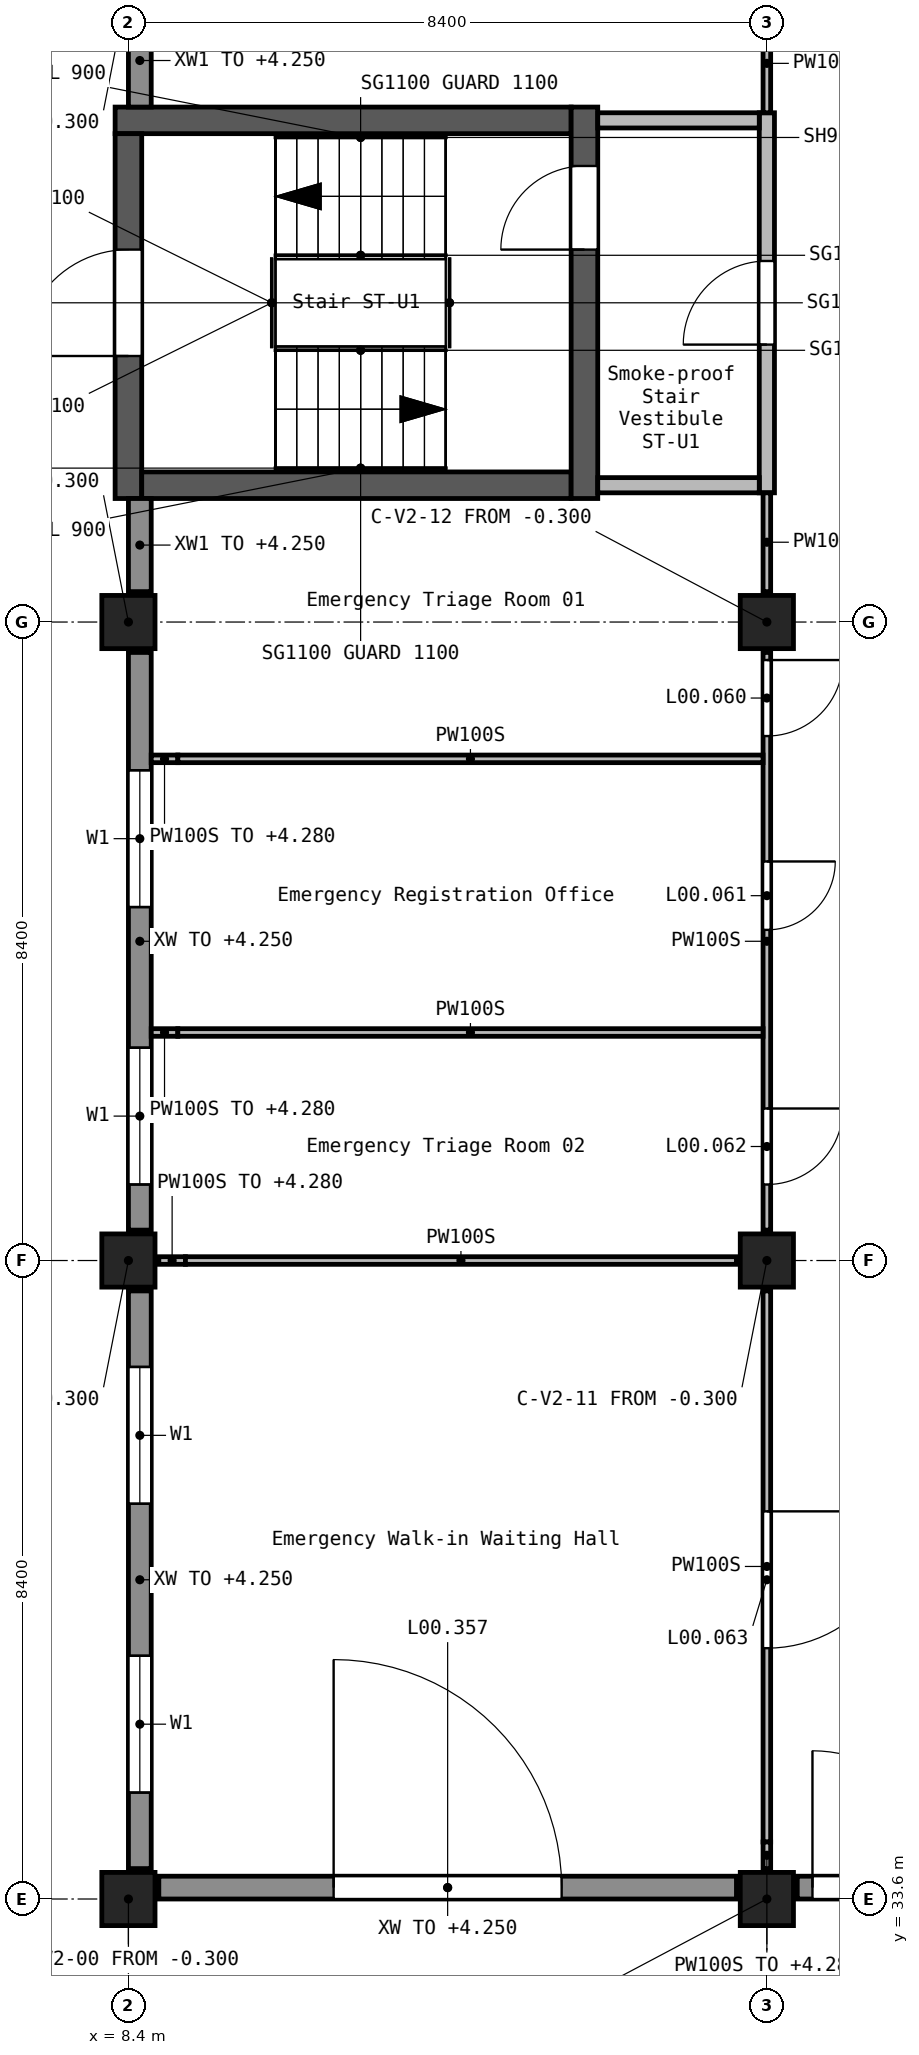
"""IFC4 building model, lengths in metres.
Left out: names, types, materials, properties, quantities, classifications, styles, units other than length and angle.
Written with IfcOpenShell. Run it as: python <this file> out.ifc"""

import sys

from ifc_helpers import new_model, si_unit, direction, frame, frame_2d, origin, origin_2d, place, context, subcontext, project, spatial, rectangle, extrude, element, fill, save


model = new_model("IFC4")
c1 = context("Model", 3, precision=1e-05, world=origin(), true_north=direction((0.0, 1.0)))
c2 = subcontext(c1, "Body", "Model", "MODEL_VIEW")
j1 = project(units=[si_unit("LENGTHUNIT", "METRE"), si_unit("PLANEANGLEUNIT", "RADIAN")], contexts=[c1])
p1 = place(None, origin())
s1 = spatial("IfcSite", under=j1, at=p1, CompositionType="ELEMENT")
p2 = place(p1, origin())
s2 = spatial("IfcBuilding", under=s1, at=p2, CompositionType="ELEMENT")
p3 = place(p2, origin())
s3 = spatial("IfcBuildingStorey", under=s2, at=p3, CompositionType="ELEMENT", Elevation=0.0)
for number, where, z_axis, x_axis in (
    (1, (8.4, 33.6, -0.3), (0.0, 0.0, 1.0), (1.0, 0.0, 0.0)),
    (2, (8.4, 42.0, -0.3), (0.0, 0.0, 1.0), (1.0, 0.0, 0.0)),
    (3, (8.4, 50.4, -0.3), (0.0, 0.0, 1.0), (1.0, 0.0, 0.0)),
    (4, (16.8, 33.6, -0.3), (0.0, 0.0, 1.0), (1.0, 0.0, 0.0)),
    (5, (16.8, 42.0, -0.3), (0.0, 0.0, 1.0), (1.0, 0.0, 0.0)),
    (6, (16.8, 50.4, -0.3), (0.0, 0.0, 1.0), (1.0, 0.0, 0.0)),
):
    element("IfcColumn", number, at=place(p3, frame(where, z_axis=z_axis, x_axis=x_axis)), inside=s3, PredefinedType="COLUMN", context=c2, shape_type="SweptSolid", body=[
        extrude(rectangle(XDim=0.7, YDim=0.7, at=origin_2d()), origin(), (0.0, 0.0, 1.0), 5.7),
    ])
p4 = place(p3, frame((8.225, 57.0, -0.3), z_axis=(0.0, 0.0, 1.0), x_axis=(1.0, 0.0, 0.0)))
e7 = element("IfcWall", 7, at=p4, inside=s3, PredefinedType="SHEAR", context=c2, shape_type="SweptSolid", body=[
    extrude(rectangle(XDim=6.0, YDim=0.35, at=frame_2d((3.0, 0.0))), origin(), (0.0, 0.0, 1.0), 5.7),
])
p5 = place(p3, frame((8.4, 52.025, -0.3), z_axis=(0.0, 0.0, 1.0), x_axis=(0.0, 1.0, 0.0)))
e8 = element("IfcWall", 8, at=p5, inside=s3, PredefinedType="SHEAR", context=c2, shape_type="SweptSolid", body=[
    extrude(rectangle(XDim=4.8, YDim=0.35, at=frame_2d((2.4, 0.0))), origin(), (0.0, 0.0, 1.0), 5.7),
])
p6 = place(p5, frame((1.875, 0.0, 0.3)))
e9 = element("IfcOpeningElement", 9, at=p6, cuts=e8, PredefinedType="OPENING", context=c2, shape_type="SweptSolid", body=[
    extrude(rectangle(XDim=1.4, YDim=2.1, at=frame_2d((0.7, 1.05))), frame((0.0, 0.185, 0.0), z_axis=(0.0, -1.0, 0.0), x_axis=(1.0, 0.0, 0.0)), (0.0, 0.0, 1.0), 0.37),
])
p7 = place(p3, frame((8.575, 52.2, -0.3), z_axis=(0.0, 0.0, 1.0), x_axis=(1.0, 0.0, 0.0)))
e10 = element("IfcWall", 10, at=p7, inside=s3, PredefinedType="SHEAR", context=c2, shape_type="SweptSolid", body=[
    extrude(rectangle(XDim=5.65, YDim=0.35, at=frame_2d((2.825, 0.0))), origin(), (0.0, 0.0, 1.0), 5.7),
])
p8 = place(p3, frame((14.4, 52.025, -0.3), z_axis=(0.0, 0.0, 1.0), x_axis=(0.0, 1.0, 0.0)))
e11 = element("IfcWall", 11, at=p8, inside=s3, PredefinedType="SHEAR", context=c2, shape_type="SweptSolid", body=[
    extrude(rectangle(XDim=5.15, YDim=0.35, at=frame_2d((2.575, 0.0))), origin(), (0.0, 0.0, 1.0), 5.7),
])
p9 = place(p8, frame((3.275, 0.0, 0.3)))
e12 = element("IfcOpeningElement", 12, at=p9, cuts=e11, PredefinedType="OPENING", context=c2, shape_type="SweptSolid", body=[
    extrude(rectangle(XDim=1.1, YDim=2.1, at=frame_2d((0.55, 1.05))), frame((0.0, 0.185, 0.0), z_axis=(0.0, -1.0, 0.0), x_axis=(1.0, 0.0, 0.0)), (0.0, 0.0, 1.0), 0.37),
])
for number, where, z_axis, x_axis in (
    (13, (8.55, 58.4, 0.0), (0.0, 0.0, 1.0), (0.0, -1.0, 0.0)),
    (14, (8.55, 52.025, 0.0), (0.0, 0.0, 1.0), (0.0, -1.0, 0.0)),
):
    element("IfcWall", number, at=place(p3, frame(where, z_axis=z_axis, x_axis=x_axis)), inside=s3, PredefinedType="STANDARD", context=c2, shape_type="SweptSolid", body=[
        extrude(rectangle(XDim=1.225, YDim=0.3, at=frame_2d((0.612, 0.0))), origin(), (0.0, 0.0, 1.0), 4.25),
    ])
p10 = place(p3, frame((8.55, 50.0, 0.0), z_axis=(0.0, 0.0, 1.0), x_axis=(0.0, -1.0, 0.0)))
e15 = element("IfcWall", 15, at=p10, inside=s3, PredefinedType="STANDARD", context=c2, shape_type="SweptSolid", body=[
    extrude(rectangle(XDim=7.6, YDim=0.3, at=frame_2d((3.8, 0.0))), origin(), (0.0, 0.0, 1.0), 4.25),
])
p11 = place(p10, frame((1.55, 0.0, 0.9)))
e16 = element("IfcOpeningElement", 16, at=p11, cuts=e15, PredefinedType="OPENING", context=c2, shape_type="SweptSolid", body=[
    extrude(rectangle(XDim=1.8, YDim=1.5, at=frame_2d((0.9, 0.75))), frame((0.0, 0.16, 0.0), z_axis=(0.0, -1.0, 0.0), x_axis=(1.0, 0.0, 0.0)), (0.0, 0.0, 1.0), 0.32),
])
p12 = place(p10, frame((5.2, 0.0, 0.9)))
e17 = element("IfcOpeningElement", 17, at=p12, cuts=e15, PredefinedType="OPENING", context=c2, shape_type="SweptSolid", body=[
    extrude(rectangle(XDim=1.8, YDim=1.5, at=frame_2d((0.9, 0.75))), frame((0.0, 0.16, 0.0), z_axis=(0.0, -1.0, 0.0), x_axis=(1.0, 0.0, 0.0)), (0.0, 0.0, 1.0), 0.32),
])
p13 = place(p3, frame((8.55, 41.6, 0.0), z_axis=(0.0, 0.0, 1.0), x_axis=(0.0, -1.0, 0.0)))
e18 = element("IfcWall", 18, at=p13, inside=s3, PredefinedType="STANDARD", context=c2, shape_type="SweptSolid", body=[
    extrude(rectangle(XDim=7.6, YDim=0.3, at=frame_2d((3.8, 0.0))), origin(), (0.0, 0.0, 1.0), 4.25),
])
p14 = place(p13, frame((1.0, 0.0, 0.9)))
e19 = element("IfcOpeningElement", 19, at=p14, cuts=e18, PredefinedType="OPENING", context=c2, shape_type="SweptSolid", body=[
    extrude(rectangle(XDim=1.8, YDim=1.5, at=frame_2d((0.9, 0.75))), frame((0.0, 0.16, 0.0), z_axis=(0.0, -1.0, 0.0), x_axis=(1.0, 0.0, 0.0)), (0.0, 0.0, 1.0), 0.32),
])
p15 = place(p13, frame((4.8, 0.0, 0.9)))
e20 = element("IfcOpeningElement", 20, at=p15, cuts=e18, PredefinedType="OPENING", context=c2, shape_type="SweptSolid", body=[
    extrude(rectangle(XDim=1.8, YDim=1.5, at=frame_2d((0.9, 0.75))), frame((0.0, 0.16, 0.0), z_axis=(0.0, -1.0, 0.0), x_axis=(1.0, 0.0, 0.0)), (0.0, 0.0, 1.0), 0.32),
])
p16 = place(p3, frame((8.8, 33.75, 0.0), z_axis=(0.0, 0.0, 1.0), x_axis=(1.0, 0.0, 0.0)))
e21 = element("IfcWall", 21, at=p16, inside=s3, PredefinedType="STANDARD", context=c2, shape_type="SweptSolid", body=[
    extrude(rectangle(XDim=7.6, YDim=0.3, at=frame_2d((3.8, 0.0))), origin(), (0.0, 0.0, 1.0), 4.25),
])
p17 = place(p16, frame((2.3, 0.0, 0.0)))
e22 = element("IfcOpeningElement", 22, at=p17, cuts=e21, PredefinedType="OPENING", context=c2, shape_type="SweptSolid", body=[
    extrude(rectangle(XDim=3.0, YDim=2.4, at=frame_2d((1.5, 1.2))), frame((0.0, 0.16, 0.0), z_axis=(0.0, -1.0, 0.0), x_axis=(1.0, 0.0, 0.0)), (0.0, 0.0, 1.0), 0.32),
])
p18 = place(p3, frame((17.2, 33.75, 0.0), z_axis=(0.0, 0.0, 1.0), x_axis=(1.0, 0.0, 0.0)))
e23 = element("IfcWall", 23, at=p18, inside=s3, PredefinedType="STANDARD", context=c2, shape_type="SweptSolid", body=[
    extrude(rectangle(XDim=7.6, YDim=0.3, at=frame_2d((3.8, 0.0))), origin(), (0.0, 0.0, 1.0), 4.25),
])
p19 = place(p18, frame((0.2, 0.0, 0.0)))
e24 = element("IfcOpeningElement", 24, at=p19, cuts=e23, PredefinedType="OPENING", context=c2, shape_type="SweptSolid", body=[
    extrude(rectangle(XDim=1.8, YDim=2.1, at=frame_2d((0.9, 1.05))), frame((0.0, 0.16, 0.0), z_axis=(0.0, -1.0, 0.0), x_axis=(1.0, 0.0, 0.0)), (0.0, 0.0, 1.0), 0.32),
])
p20 = place(p18, frame((4.8, 0.0, 0.9)))
e25 = element("IfcOpeningElement", 25, at=p20, cuts=e23, PredefinedType="OPENING", context=c2, shape_type="SweptSolid", body=[
    extrude(rectangle(XDim=1.8, YDim=1.5, at=frame_2d((0.9, 0.75))), frame((0.0, 0.16, 0.0), z_axis=(0.0, -1.0, 0.0), x_axis=(1.0, 0.0, 0.0)), (0.0, 0.0, 1.0), 0.32),
])
p21 = place(p3, frame((16.8, 52.1, 0.0), z_axis=(0.0, 0.0, 1.0), x_axis=(0.0, 1.0, 0.0)))
e26 = element("IfcWall", 26, at=p21, inside=s3, PredefinedType="SOLIDWALL", context=c2, shape_type="SweptSolid", body=[
    extrude(rectangle(XDim=5.0, YDim=0.2, at=frame_2d((2.5, 0.0))), origin(), (0.0, 0.0, 1.0), 5.05),
])
p22 = place(p21, frame((1.95, 0.0, 0.0)))
e27 = element("IfcOpeningElement", 27, at=p22, cuts=e26, PredefinedType="OPENING", context=c2, shape_type="SweptSolid", body=[
    extrude(rectangle(XDim=1.1, YDim=2.1, at=frame_2d((0.55, 1.05))), frame((0.0, 0.11, 0.0), z_axis=(0.0, -1.0, 0.0), x_axis=(1.0, 0.0, 0.0)), (0.0, 0.0, 1.0), 0.22),
])
for number, where, z_axis, x_axis in (
    (28, (14.575, 52.2, 0.0), (0.0, 0.0, 1.0), (1.0, 0.0, 0.0)),
    (29, (14.575, 57.0, 0.0), (0.0, 0.0, 1.0), (1.0, 0.0, 0.0)),
):
    element("IfcWall", number, at=place(p3, frame(where, z_axis=z_axis, x_axis=x_axis)), inside=s3, PredefinedType="SOLIDWALL", context=c2, shape_type="SweptSolid", body=[
        extrude(rectangle(XDim=2.125, YDim=0.2, at=frame_2d((1.062, 0.0))), origin(), (0.0, 0.0, 1.0), 5.05),
    ])
p23 = place(p3, frame((16.8, 52.1, 0.0), z_axis=(0.0, 0.0, 1.0), x_axis=(0.0, -1.0, 0.0)))
e30 = element("IfcWall", 30, at=p23, inside=s3, PredefinedType="PARTITIONING", context=c2, shape_type="SweptSolid", body=[
    extrude(rectangle(XDim=1.3, YDim=0.1, at=frame_2d((0.65, 0.0))), origin(), (0.0, 0.0, 1.0), 5.05),
])
p24 = place(p3, frame((16.8, 50.0, 0.0), z_axis=(0.0, 0.0, 1.0), x_axis=(0.0, -1.0, 0.0)))
e31 = element("IfcWall", 31, at=p24, inside=s3, PredefinedType="PARTITIONING", context=c2, shape_type="SweptSolid", body=[
    extrude(rectangle(XDim=7.6, YDim=0.1, at=frame_2d((3.8, 0.0))), origin(), (0.0, 0.0, 1.0), 5.05),
])
p25 = place(p24, frame((0.1, 0.0, 0.0)))
e32 = element("IfcOpeningElement", 32, at=p25, cuts=e31, PredefinedType="OPENING", context=c2, shape_type="SweptSolid", body=[
    extrude(rectangle(XDim=1.0, YDim=2.1, at=frame_2d((0.5, 1.05))), frame((0.0, 0.06, 0.0), z_axis=(0.0, -1.0, 0.0), x_axis=(1.0, 0.0, 0.0)), (0.0, 0.0, 1.0), 0.12),
])
p26 = place(p24, frame((2.75, 0.0, 0.0)))
e33 = element("IfcOpeningElement", 33, at=p26, cuts=e31, PredefinedType="OPENING", context=c2, shape_type="SweptSolid", body=[
    extrude(rectangle(XDim=0.9, YDim=2.1, at=frame_2d((0.45, 1.05))), frame((0.0, 0.06, 0.0), z_axis=(0.0, -1.0, 0.0), x_axis=(1.0, 0.0, 0.0)), (0.0, 0.0, 1.0), 0.12),
])
p27 = place(p24, frame((6.0, 0.0, 0.0)))
e34 = element("IfcOpeningElement", 34, at=p27, cuts=e31, PredefinedType="OPENING", context=c2, shape_type="SweptSolid", body=[
    extrude(rectangle(XDim=1.0, YDim=2.1, at=frame_2d((0.5, 1.05))), frame((0.0, 0.06, 0.0), z_axis=(0.0, -1.0, 0.0), x_axis=(1.0, 0.0, 0.0)), (0.0, 0.0, 1.0), 0.12),
])
p28 = place(p3, frame((16.8, 41.6, 0.0), z_axis=(0.0, 0.0, 1.0), x_axis=(0.0, -1.0, 0.0)))
e35 = element("IfcWall", 35, at=p28, inside=s3, PredefinedType="PARTITIONING", context=c2, shape_type="SweptSolid", body=[
    extrude(rectangle(XDim=7.25, YDim=0.1, at=frame_2d((3.625, 0.0))), origin(), (0.0, 0.0, 1.0), 5.05),
])
p29 = place(p28, frame((2.9, 0.0, 0.0)))
e36 = element("IfcOpeningElement", 36, at=p29, cuts=e35, PredefinedType="OPENING", context=c2, shape_type="SweptSolid", body=[
    extrude(rectangle(XDim=1.8, YDim=2.1, at=frame_2d((0.9, 1.05))), frame((0.0, 0.06, 0.0), z_axis=(0.0, -1.0, 0.0), x_axis=(1.0, 0.0, 0.0)), (0.0, 0.0, 1.0), 0.12),
])
p30 = place(p3, frame((16.8, 34.35, 0.0), z_axis=(0.0, 0.0, 1.0), x_axis=(0.0, -1.0, 0.0)))
e37 = element("IfcWall", 37, at=p30, inside=s3, PredefinedType="PARTITIONING", context=c2, shape_type="SweptSolid", body=[
    extrude(rectangle(XDim=0.35, YDim=0.1, at=frame_2d((0.175, 0.0))), origin(), (0.0, 0.0, 1.0), 4.28),
])
p31 = place(p3, frame((16.8, 58.4, 0.0), z_axis=(0.0, 0.0, 1.0), x_axis=(0.0, -1.0, 0.0)))
e38 = element("IfcWall", 38, at=p31, inside=s3, PredefinedType="PARTITIONING", context=c2, shape_type="SweptSolid", body=[
    extrude(rectangle(XDim=1.3, YDim=0.1, at=frame_2d((0.65, 0.0))), origin(), (0.0, 0.0, 1.0), 5.05),
])
p32 = place(p3, frame((8.8, 42.0, 0.0), z_axis=(0.0, 0.0, 1.0), x_axis=(1.0, 0.0, 0.0)))
e39 = element("IfcWall", 39, at=p32, inside=s3, PredefinedType="PARTITIONING", context=c2, shape_type="SweptSolid", body=[
    extrude(rectangle(XDim=0.35, YDim=0.1, at=frame_2d((0.175, 0.0))), origin(), (0.0, 0.0, 1.0), 4.28),
])
p33 = place(p3, frame((9.15, 42.0, 0.0), z_axis=(0.0, 0.0, 1.0), x_axis=(1.0, 0.0, 0.0)))
e40 = element("IfcWall", 40, at=p33, inside=s3, PredefinedType="PARTITIONING", context=c2, shape_type="SweptSolid", body=[
    extrude(rectangle(XDim=7.25, YDim=0.1, at=frame_2d((3.625, 0.0))), origin(), (0.0, 0.0, 1.0), 5.05),
])
p34 = place(p3, frame((8.7, 45.0, 0.0), z_axis=(0.0, 0.0, 1.0), x_axis=(1.0, 0.0, 0.0)))
e41 = element("IfcWall", 41, at=p34, inside=s3, PredefinedType="PARTITIONING", context=c2, shape_type="SweptSolid", body=[
    extrude(rectangle(XDim=0.35, YDim=0.1, at=frame_2d((0.175, 0.0))), origin(), (0.0, 0.0, 1.0), 4.28),
])
p35 = place(p3, frame((9.05, 45.0, 0.0), z_axis=(0.0, 0.0, 1.0), x_axis=(1.0, 0.0, 0.0)))
e42 = element("IfcWall", 42, at=p35, inside=s3, PredefinedType="PARTITIONING", context=c2, shape_type="SweptSolid", body=[
    extrude(rectangle(XDim=7.7, YDim=0.1, at=frame_2d((3.85, 0.0))), origin(), (0.0, 0.0, 1.0), 5.05),
])
p36 = place(p3, frame((8.7, 48.6, 0.0), z_axis=(0.0, 0.0, 1.0), x_axis=(1.0, 0.0, 0.0)))
e43 = element("IfcWall", 43, at=p36, inside=s3, PredefinedType="PARTITIONING", context=c2, shape_type="SweptSolid", body=[
    extrude(rectangle(XDim=0.35, YDim=0.1, at=frame_2d((0.175, 0.0))), origin(), (0.0, 0.0, 1.0), 4.28),
])
p37 = place(p3, frame((9.05, 48.6, 0.0), z_axis=(0.0, 0.0, 1.0), x_axis=(1.0, 0.0, 0.0)))
e44 = element("IfcWall", 44, at=p37, inside=s3, PredefinedType="PARTITIONING", context=c2, shape_type="SweptSolid", body=[
    extrude(rectangle(XDim=7.7, YDim=0.1, at=frame_2d((3.85, 0.0))), origin(), (0.0, 0.0, 1.0), 5.05),
])
p38 = place(p6, origin())
e45 = element("IfcDoor", 45, at=p38, inside=s3, OperationType="SINGLE_SWING_LEFT", PredefinedType="DOOR", context=c2, shape_type="SweptSolid", body=[
    extrude(rectangle(XDim=1.4, YDim=2.1, at=frame_2d((0.7, 1.05))), frame((0.0, 0.025, 0.0), z_axis=(0.0, -1.0, 0.0), x_axis=(1.0, 0.0, 0.0)), (0.0, 0.0, 1.0), 0.05),
])
fill(e9, e45)
p39 = place(p17, frame((3.0, 0.0, 0.0), z_axis=(0.0, 0.0, 1.0), x_axis=(-1.0, 0.0, 0.0)))
e46 = element("IfcDoor", 46, at=p39, inside=s3, OperationType="SINGLE_SWING_LEFT", PredefinedType="DOOR", context=c2, shape_type="SweptSolid", body=[
    extrude(rectangle(XDim=3.0, YDim=2.4, at=frame_2d((1.5, 1.2))), frame((0.0, 0.025, 0.0), z_axis=(0.0, -1.0, 0.0), x_axis=(1.0, 0.0, 0.0)), (0.0, 0.0, 1.0), 0.05),
])
fill(e22, e46)
p40 = place(p19, frame((1.8, 0.0, 0.0), z_axis=(0.0, 0.0, 1.0), x_axis=(-1.0, 0.0, 0.0)))
e47 = element("IfcDoor", 47, at=p40, inside=s3, OperationType="SINGLE_SWING_LEFT", PredefinedType="DOOR", context=c2, shape_type="SweptSolid", body=[
    extrude(rectangle(XDim=1.8, YDim=2.1, at=frame_2d((0.9, 1.05))), frame((0.0, 0.025, 0.0), z_axis=(0.0, -1.0, 0.0), x_axis=(1.0, 0.0, 0.0)), (0.0, 0.0, 1.0), 0.05),
])
fill(e24, e47)
p41 = place(p11, origin())
e48 = element("IfcWindow", 48, at=p41, inside=s3, PartitioningType="SINGLE_PANEL", PredefinedType="WINDOW", context=c2, shape_type="SweptSolid", body=[
    extrude(rectangle(XDim=1.8, YDim=1.5, at=frame_2d((0.9, 0.75))), frame((0.0, 0.03, 0.0), z_axis=(0.0, -1.0, 0.0), x_axis=(1.0, 0.0, 0.0)), (0.0, 0.0, 1.0), 0.06),
])
fill(e16, e48)
p42 = place(p12, origin())
e49 = element("IfcWindow", 49, at=p42, inside=s3, PartitioningType="SINGLE_PANEL", PredefinedType="WINDOW", context=c2, shape_type="SweptSolid", body=[
    extrude(rectangle(XDim=1.8, YDim=1.5, at=frame_2d((0.9, 0.75))), frame((0.0, 0.03, 0.0), z_axis=(0.0, -1.0, 0.0), x_axis=(1.0, 0.0, 0.0)), (0.0, 0.0, 1.0), 0.06),
])
fill(e17, e49)
p43 = place(p14, origin())
e50 = element("IfcWindow", 50, at=p43, inside=s3, PartitioningType="SINGLE_PANEL", PredefinedType="WINDOW", context=c2, shape_type="SweptSolid", body=[
    extrude(rectangle(XDim=1.8, YDim=1.5, at=frame_2d((0.9, 0.75))), frame((0.0, 0.03, 0.0), z_axis=(0.0, -1.0, 0.0), x_axis=(1.0, 0.0, 0.0)), (0.0, 0.0, 1.0), 0.06),
])
fill(e19, e50)
p44 = place(p15, origin())
e51 = element("IfcWindow", 51, at=p44, inside=s3, PartitioningType="SINGLE_PANEL", PredefinedType="WINDOW", context=c2, shape_type="SweptSolid", body=[
    extrude(rectangle(XDim=1.8, YDim=1.5, at=frame_2d((0.9, 0.75))), frame((0.0, 0.03, 0.0), z_axis=(0.0, -1.0, 0.0), x_axis=(1.0, 0.0, 0.0)), (0.0, 0.0, 1.0), 0.06),
])
fill(e20, e51)
p45 = place(p9, origin())
e52 = element("IfcDoor", 52, at=p45, inside=s3, OperationType="SINGLE_SWING_RIGHT", PredefinedType="DOOR", context=c2, shape_type="SweptSolid", body=[
    extrude(rectangle(XDim=1.1, YDim=2.1, at=frame_2d((0.55, 1.05))), frame((0.0, 0.025, 0.0), z_axis=(0.0, -1.0, 0.0), x_axis=(1.0, 0.0, 0.0)), (0.0, 0.0, 1.0), 0.05),
])
fill(e12, e52)
p46 = place(p22, origin())
e53 = element("IfcDoor", 53, at=p46, inside=s3, OperationType="SINGLE_SWING_LEFT", PredefinedType="DOOR", context=c2, shape_type="SweptSolid", body=[
    extrude(rectangle(XDim=1.1, YDim=2.1, at=frame_2d((0.55, 1.05))), frame((0.0, 0.025, 0.0), z_axis=(0.0, -1.0, 0.0), x_axis=(1.0, 0.0, 0.0)), (0.0, 0.0, 1.0), 0.05),
])
fill(e27, e53)
p47 = place(p25, frame((1.0, 0.0, 0.0), z_axis=(0.0, 0.0, 1.0), x_axis=(-1.0, 0.0, 0.0)))
e54 = element("IfcDoor", 54, at=p47, inside=s3, OperationType="SINGLE_SWING_RIGHT", PredefinedType="DOOR", context=c2, shape_type="SweptSolid", body=[
    extrude(rectangle(XDim=1.0, YDim=2.1, at=frame_2d((0.5, 1.05))), frame((0.0, 0.025, 0.0), z_axis=(0.0, -1.0, 0.0), x_axis=(1.0, 0.0, 0.0)), (0.0, 0.0, 1.0), 0.05),
])
fill(e32, e54)
p48 = place(p26, frame((0.9, 0.0, 0.0), z_axis=(0.0, 0.0, 1.0), x_axis=(-1.0, 0.0, 0.0)))
e55 = element("IfcDoor", 55, at=p48, inside=s3, OperationType="SINGLE_SWING_RIGHT", PredefinedType="DOOR", context=c2, shape_type="SweptSolid", body=[
    extrude(rectangle(XDim=0.9, YDim=2.1, at=frame_2d((0.45, 1.05))), frame((0.0, 0.025, 0.0), z_axis=(0.0, -1.0, 0.0), x_axis=(1.0, 0.0, 0.0)), (0.0, 0.0, 1.0), 0.05),
])
fill(e33, e55)
p49 = place(p27, frame((1.0, 0.0, 0.0), z_axis=(0.0, 0.0, 1.0), x_axis=(-1.0, 0.0, 0.0)))
e56 = element("IfcDoor", 56, at=p49, inside=s3, OperationType="SINGLE_SWING_LEFT", PredefinedType="DOOR", context=c2, shape_type="SweptSolid", body=[
    extrude(rectangle(XDim=1.0, YDim=2.1, at=frame_2d((0.5, 1.05))), frame((0.0, 0.025, 0.0), z_axis=(0.0, -1.0, 0.0), x_axis=(1.0, 0.0, 0.0)), (0.0, 0.0, 1.0), 0.05),
])
fill(e34, e56)
p50 = place(p29, frame((1.8, 0.0, 0.0), z_axis=(0.0, 0.0, 1.0), x_axis=(-1.0, 0.0, 0.0)))
e57 = element("IfcDoor", 57, at=p50, inside=s3, OperationType="DOUBLE_DOOR_SINGLE_SWING", PredefinedType="DOOR", context=c2, shape_type="SweptSolid", body=[
    extrude(rectangle(XDim=1.8, YDim=2.1, at=frame_2d((0.9, 1.05))), frame((0.0, 0.025, 0.0), z_axis=(0.0, -1.0, 0.0), x_axis=(1.0, 0.0, 0.0)), (0.0, 0.0, 1.0), 0.05),
])
fill(e36, e57)
save(model, sys.argv[1])
